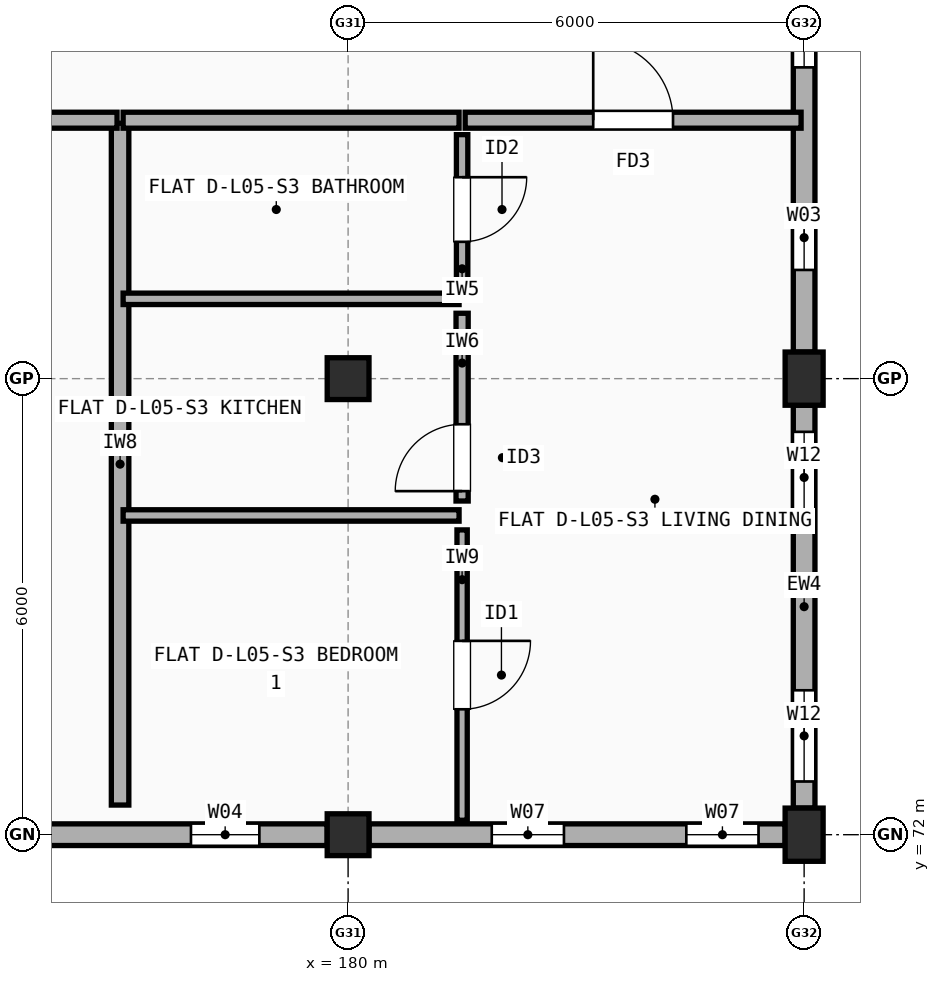
"""IFC4 building model, lengths in metres.
Left out: names, types, materials, properties, quantities, classifications, styles, units other than length and angle.
Written with IfcOpenShell. Run it as: python <this file> out.ifc"""

import sys

from ifc_helpers import new_model, si_unit, direction, frame, frame_2d, origin, origin_2d, place, context, subcontext, project, spatial, rectangle, extrude, element, fill, save


model = new_model("IFC4")
c1 = context("Model", 3, precision=1e-05, world=origin(), true_north=direction((0.0, 1.0)))
c2 = subcontext(c1, "Body", "Model", "MODEL_VIEW")
j1 = project(units=[si_unit("LENGTHUNIT", "METRE"), si_unit("PLANEANGLEUNIT", "RADIAN")], contexts=[c1])
p1 = place(None, origin())
s1 = spatial("IfcSite", under=j1, at=p1, CompositionType="ELEMENT")
p2 = place(p1, origin())
s2 = spatial("IfcBuilding", under=s1, at=p2, CompositionType="ELEMENT")
p3 = place(p2, frame((0.0, 0.0, 17.3)))
s3 = spatial("IfcBuildingStorey", under=s2, at=p3, CompositionType="ELEMENT", Elevation=17.3)
for number, where, z_axis, x_axis in (
    (1, (180.0, 72.0, 0.0), (0.0, 0.0, 1.0), (1.0, 0.0, 0.0)),
    (2, (180.0, 78.0, 0.0), (0.0, 0.0, 1.0), (1.0, 0.0, 0.0)),
):
    element("IfcColumn", number, at=place(p3, frame(where, z_axis=z_axis, x_axis=x_axis)), inside=s3, PredefinedType="COLUMN", context=c2, shape_type="SweptSolid", body=[
        extrude(rectangle(XDim=0.55, YDim=0.55, at=origin_2d()), origin(), (0.0, 0.0, 1.0), 2.965),
    ])
for number, where, z_axis, x_axis in (
    (3, (186.0, 72.0, 0.0), (0.0, 0.0, 1.0), (1.0, 0.0, 0.0)),
    (4, (186.0, 78.0, 0.0), (0.0, 0.0, 1.0), (1.0, 0.0, 0.0)),
):
    element("IfcColumn", number, at=place(p3, frame(where, z_axis=z_axis, x_axis=x_axis)), inside=s3, PredefinedType="COLUMN", context=c2, shape_type="SweptSolid", body=[
        extrude(rectangle(XDim=0.5, YDim=0.7, at=origin_2d()), origin(), (0.0, 0.0, 1.0), 2.965),
    ])
p4 = place(p3, frame((174.275, 72.0, 0.0), z_axis=(0.0, 0.0, 1.0), x_axis=(1.0, 0.0, 0.0)))
e5 = element("IfcWall", 5, at=p4, inside=s3, PredefinedType="STANDARD", context=c2, shape_type="SweptSolid", body=[
    extrude(rectangle(XDim=5.45, YDim=0.285, at=frame_2d((2.725, 0.0))), origin(), (0.0, 0.0, 1.0), 2.447),
])
p5 = place(p4, frame((0.917, 0.0, 0.9)))
e6 = element("IfcOpeningElement", 6, at=p5, cuts=e5, PredefinedType="OPENING", context=c2, shape_type="SweptSolid", body=[
    extrude(rectangle(XDim=0.85, YDim=1.25, at=frame_2d((0.425, 0.625))), frame((0.0, 0.152, 0.0), z_axis=(0.0, -1.0, 0.0), x_axis=(1.0, 0.0, 0.0)), (0.0, 0.0, 1.0), 0.305),
])
p6 = place(p4, frame((3.657, 0.0, 0.9)))
e7 = element("IfcOpeningElement", 7, at=p6, cuts=e5, PredefinedType="OPENING", context=c2, shape_type="SweptSolid", body=[
    extrude(rectangle(XDim=0.9, YDim=1.3, at=frame_2d((0.45, 0.65))), frame((0.0, 0.152, 0.0), z_axis=(0.0, -1.0, 0.0), x_axis=(1.0, 0.0, 0.0)), (0.0, 0.0, 1.0), 0.305),
])
p7 = place(p3, frame((180.275, 72.0, 0.0), z_axis=(0.0, 0.0, 1.0), x_axis=(1.0, 0.0, 0.0)))
e8 = element("IfcWall", 8, at=p7, inside=s3, PredefinedType="STANDARD", context=c2, shape_type="SweptSolid", body=[
    extrude(rectangle(XDim=5.475, YDim=0.285, at=frame_2d((2.738, 0.0))), origin(), (0.0, 0.0, 1.0), 2.447),
])
p8 = place(p7, frame((1.615, 0.0, 0.9)))
e9 = element("IfcOpeningElement", 9, at=p8, cuts=e8, PredefinedType="OPENING", context=c2, shape_type="SweptSolid", body=[
    extrude(rectangle(XDim=0.95, YDim=1.35, at=frame_2d((0.475, 0.675))), frame((0.0, 0.152, 0.0), z_axis=(0.0, -1.0, 0.0), x_axis=(1.0, 0.0, 0.0)), (0.0, 0.0, 1.0), 0.305),
])
p9 = place(p7, frame((4.175, 0.0, 0.9)))
e10 = element("IfcOpeningElement", 10, at=p9, cuts=e8, PredefinedType="OPENING", context=c2, shape_type="SweptSolid", body=[
    extrude(rectangle(XDim=0.95, YDim=1.35, at=frame_2d((0.475, 0.675))), frame((0.0, 0.152, 0.0), z_axis=(0.0, -1.0, 0.0), x_axis=(1.0, 0.0, 0.0)), (0.0, 0.0, 1.0), 0.305),
])
p10 = place(p3, frame((186.0, 72.35, 0.0), z_axis=(0.0, 0.0, 1.0), x_axis=(0.0, 1.0, 0.0)))
e11 = element("IfcWall", 11, at=p10, inside=s3, PredefinedType="STANDARD", context=c2, shape_type="SweptSolid", body=[
    extrude(rectangle(XDim=5.3, YDim=0.285, at=frame_2d((2.65, 0.0))), origin(), (0.0, 0.0, 1.0), 2.447),
])
p11 = place(p10, frame((0.35, 0.0, 0.9)))
e12 = element("IfcOpeningElement", 12, at=p11, cuts=e11, PredefinedType="OPENING", context=c2, shape_type="SweptSolid", body=[
    extrude(rectangle(XDim=1.2, YDim=1.35, at=frame_2d((0.6, 0.675))), frame((0.0, 0.152, 0.0), z_axis=(0.0, -1.0, 0.0), x_axis=(1.0, 0.0, 0.0)), (0.0, 0.0, 1.0), 0.305),
])
p12 = place(p10, frame((3.75, 0.0, 0.9)))
e13 = element("IfcOpeningElement", 13, at=p12, cuts=e11, PredefinedType="OPENING", context=c2, shape_type="SweptSolid", body=[
    extrude(rectangle(XDim=1.2, YDim=1.35, at=frame_2d((0.6, 0.675))), frame((0.0, 0.152, 0.0), z_axis=(0.0, -1.0, 0.0), x_axis=(1.0, 0.0, 0.0)), (0.0, 0.0, 1.0), 0.305),
])
p13 = place(p3, frame((186.0, 78.35, 0.0), z_axis=(0.0, 0.0, 1.0), x_axis=(0.0, 1.0, 0.0)))
e14 = element("IfcWall", 14, at=p13, inside=s3, PredefinedType="STANDARD", context=c2, shape_type="SweptSolid", body=[
    extrude(rectangle(XDim=5.3, YDim=0.285, at=frame_2d((2.65, 0.0))), origin(), (0.0, 0.0, 1.0), 2.447),
])
p14 = place(p13, frame((1.08, 0.0, 0.9)))
e15 = element("IfcOpeningElement", 15, at=p14, cuts=e14, PredefinedType="OPENING", context=c2, shape_type="SweptSolid", body=[
    extrude(rectangle(XDim=0.85, YDim=1.25, at=frame_2d((0.425, 0.625))), frame((0.0, 0.152, 0.0), z_axis=(0.0, -1.0, 0.0), x_axis=(1.0, 0.0, 0.0)), (0.0, 0.0, 1.0), 0.305),
])
p15 = place(p13, frame((3.745, 0.0, 0.9)))
e16 = element("IfcOpeningElement", 16, at=p15, cuts=e14, PredefinedType="OPENING", context=c2, shape_type="SweptSolid", body=[
    extrude(rectangle(XDim=0.9, YDim=1.3, at=frame_2d((0.45, 0.65))), frame((0.0, 0.152, 0.0), z_axis=(0.0, -1.0, 0.0), x_axis=(1.0, 0.0, 0.0)), (0.0, 0.0, 1.0), 0.305),
])
p16 = place(p3, frame((177.0, 72.39, 0.0), z_axis=(0.0, 0.0, 1.0), x_axis=(0.0, 1.0, 0.0)))
e17 = element("IfcWall", 17, at=p16, inside=s3, PredefinedType="SOLIDWALL", context=c2, shape_type="SweptSolid", body=[
    extrude(rectangle(XDim=8.97, YDim=0.23, at=frame_2d((4.485, 0.0))), origin(), (0.0, 0.0, 1.0), 2.447),
])
p17 = place(p3, frame((171.04, 81.4, 0.0), z_axis=(0.0, 0.0, 1.0), x_axis=(1.0, 0.0, 0.0)))
e18 = element("IfcWall", 18, at=p17, inside=s3, PredefinedType="SOLIDWALL", context=c2, shape_type="SweptSolid", body=[
    extrude(rectangle(XDim=5.92, YDim=0.21, at=frame_2d((2.96, 0.0))), origin(), (0.0, 0.0, 1.0), 2.508),
])
p18 = place(p17, frame((2.47, 0.0, 0.0)))
e19 = element("IfcOpeningElement", 19, at=p18, cuts=e18, PredefinedType="OPENING", context=c2, shape_type="SweptSolid", body=[
    extrude(rectangle(XDim=0.98, YDim=2.15, at=frame_2d((0.49, 1.075))), frame((0.0, 0.115, 0.0), z_axis=(0.0, -1.0, 0.0), x_axis=(1.0, 0.0, 0.0)), (0.0, 0.0, 1.0), 0.23),
])
p19 = place(p3, frame((177.04, 81.4, 0.0), z_axis=(0.0, 0.0, 1.0), x_axis=(1.0, 0.0, 0.0)))
e20 = element("IfcWall", 20, at=p19, inside=s3, PredefinedType="SOLIDWALL", context=c2, shape_type="SweptSolid", body=[
    extrude(rectangle(XDim=4.42, YDim=0.21, at=frame_2d((2.21, 0.0))), origin(), (0.0, 0.0, 1.0), 2.508),
])
p20 = place(p3, frame((181.54, 81.4, 0.0), z_axis=(0.0, 0.0, 1.0), x_axis=(1.0, 0.0, 0.0)))
e21 = element("IfcWall", 21, at=p20, inside=s3, PredefinedType="SOLIDWALL", context=c2, shape_type="SweptSolid", body=[
    extrude(rectangle(XDim=4.42, YDim=0.21, at=frame_2d((2.21, 0.0))), origin(), (0.0, 0.0, 1.0), 2.447),
])
p21 = place(p20, frame((1.685, 0.0, 0.0)))
e22 = element("IfcOpeningElement", 22, at=p21, cuts=e21, PredefinedType="OPENING", context=c2, shape_type="SweptSolid", body=[
    extrude(rectangle(XDim=1.05, YDim=2.15, at=frame_2d((0.525, 1.075))), frame((0.0, 0.115, 0.0), z_axis=(0.0, -1.0, 0.0), x_axis=(1.0, 0.0, 0.0)), (0.0, 0.0, 1.0), 0.23),
])
p22 = place(p3, frame((181.5, 72.19, 0.0), z_axis=(0.0, 0.0, 1.0), x_axis=(0.0, 1.0, 0.0)))
e23 = element("IfcWall", 23, at=p22, inside=s3, PredefinedType="PARTITIONING", context=c2, shape_type="SweptSolid", body=[
    extrude(rectangle(XDim=3.82, YDim=0.135, at=frame_2d((1.91, 0.0))), origin(), (0.0, 0.0, 1.0), 2.965),
])
p23 = place(p22, frame((1.46, 0.0, 0.0)))
e24 = element("IfcOpeningElement", 24, at=p23, cuts=e23, PredefinedType="OPENING", context=c2, shape_type="SweptSolid", body=[
    extrude(rectangle(XDim=0.9, YDim=2.1, at=frame_2d((0.45, 1.05))), frame((0.0, 0.077, 0.0), z_axis=(0.0, -1.0, 0.0), x_axis=(1.0, 0.0, 0.0)), (0.0, 0.0, 1.0), 0.155),
])
p24 = place(p3, frame((181.5, 76.39, 0.0), z_axis=(0.0, 0.0, 1.0), x_axis=(0.0, 1.0, 0.0)))
e25 = element("IfcWall", 25, at=p24, inside=s3, PredefinedType="PLUMBINGWALL", context=c2, shape_type="SweptSolid", body=[
    extrude(rectangle(XDim=2.47, YDim=0.16, at=frame_2d((1.235, 0.0))), origin(), (0.0, 0.0, 1.0), 2.447),
])
p25 = place(p24, frame((0.13, 0.0, 0.0)))
e26 = element("IfcOpeningElement", 26, at=p25, cuts=e25, PredefinedType="OPENING", context=c2, shape_type="SweptSolid", body=[
    extrude(rectangle(XDim=0.88, YDim=2.1, at=frame_2d((0.44, 1.05))), frame((0.0, 0.09, 0.0), z_axis=(0.0, -1.0, 0.0), x_axis=(1.0, 0.0, 0.0)), (0.0, 0.0, 1.0), 0.18),
])
p26 = place(p3, frame((181.5, 79.24, 0.0), z_axis=(0.0, 0.0, 1.0), x_axis=(0.0, 1.0, 0.0)))
e27 = element("IfcWall", 27, at=p26, inside=s3, PredefinedType="PARTITIONING", context=c2, shape_type="SweptSolid", body=[
    extrude(rectangle(XDim=1.97, YDim=0.15, at=frame_2d((0.985, 0.0))), origin(), (0.0, 0.0, 1.0), 2.965),
])
p27 = place(p26, frame((0.56, 0.0, 0.0)))
e28 = element("IfcOpeningElement", 28, at=p27, cuts=e27, PredefinedType="OPENING", context=c2, shape_type="SweptSolid", body=[
    extrude(rectangle(XDim=0.85, YDim=2.1, at=frame_2d((0.425, 1.05))), frame((0.0, 0.085, 0.0), z_axis=(0.0, -1.0, 0.0), x_axis=(1.0, 0.0, 0.0)), (0.0, 0.0, 1.0), 0.17),
])
p28 = place(p3, frame((177.04, 76.2, 0.0), z_axis=(0.0, 0.0, 1.0), x_axis=(1.0, 0.0, 0.0)))
e29 = element("IfcWall", 29, at=p28, inside=s3, PredefinedType="PARTITIONING", context=c2, shape_type="SweptSolid", body=[
    extrude(rectangle(XDim=4.42, YDim=0.15, at=frame_2d((2.21, 0.0))), origin(), (0.0, 0.0, 1.0), 2.548),
])
p29 = place(p3, frame((177.04, 79.05, 0.0), z_axis=(0.0, 0.0, 1.0), x_axis=(1.0, 0.0, 0.0)))
e30 = element("IfcWall", 30, at=p29, inside=s3, PredefinedType="PARTITIONING", context=c2, shape_type="SweptSolid", body=[
    extrude(rectangle(XDim=4.42, YDim=0.15, at=frame_2d((2.21, 0.0))), origin(), (0.0, 0.0, 1.0), 2.508),
])
p30 = place(p6, origin())
e31 = element("IfcWindow", 31, at=p30, inside=s3, PartitioningType="SINGLE_PANEL", PredefinedType="WINDOW", context=c2, shape_type="SweptSolid", body=[
    extrude(rectangle(XDim=0.9, YDim=1.3, at=frame_2d((0.45, 0.65))), frame((0.0, 0.03, 0.0), z_axis=(0.0, -1.0, 0.0), x_axis=(1.0, 0.0, 0.0)), (0.0, 0.0, 1.0), 0.06),
])
fill(e7, e31)
p31 = place(p8, origin())
e32 = element("IfcWindow", 32, at=p31, inside=s3, PartitioningType="SINGLE_PANEL", PredefinedType="WINDOW", context=c2, shape_type="SweptSolid", body=[
    extrude(rectangle(XDim=0.95, YDim=1.35, at=frame_2d((0.475, 0.675))), frame((0.0, 0.03, 0.0), z_axis=(0.0, -1.0, 0.0), x_axis=(1.0, 0.0, 0.0)), (0.0, 0.0, 1.0), 0.06),
])
fill(e9, e32)
p32 = place(p9, origin())
e33 = element("IfcWindow", 33, at=p32, inside=s3, PartitioningType="SINGLE_PANEL", PredefinedType="WINDOW", context=c2, shape_type="SweptSolid", body=[
    extrude(rectangle(XDim=0.95, YDim=1.35, at=frame_2d((0.475, 0.675))), frame((0.0, 0.03, 0.0), z_axis=(0.0, -1.0, 0.0), x_axis=(1.0, 0.0, 0.0)), (0.0, 0.0, 1.0), 0.06),
])
fill(e10, e33)
p33 = place(p11, origin())
e34 = element("IfcWindow", 34, at=p33, inside=s3, PartitioningType="SINGLE_PANEL", PredefinedType="WINDOW", context=c2, shape_type="SweptSolid", body=[
    extrude(rectangle(XDim=1.2, YDim=1.35, at=frame_2d((0.6, 0.675))), frame((0.0, 0.03, 0.0), z_axis=(0.0, -1.0, 0.0), x_axis=(1.0, 0.0, 0.0)), (0.0, 0.0, 1.0), 0.06),
])
fill(e12, e34)
p34 = place(p12, origin())
e35 = element("IfcWindow", 35, at=p34, inside=s3, PartitioningType="SINGLE_PANEL", PredefinedType="WINDOW", context=c2, shape_type="SweptSolid", body=[
    extrude(rectangle(XDim=1.2, YDim=1.35, at=frame_2d((0.6, 0.675))), frame((0.0, 0.03, 0.0), z_axis=(0.0, -1.0, 0.0), x_axis=(1.0, 0.0, 0.0)), (0.0, 0.0, 1.0), 0.06),
])
fill(e13, e35)
p35 = place(p14, origin())
e36 = element("IfcWindow", 36, at=p35, inside=s3, PartitioningType="SINGLE_PANEL", PredefinedType="WINDOW", context=c2, shape_type="SweptSolid", body=[
    extrude(rectangle(XDim=0.85, YDim=1.25, at=frame_2d((0.425, 0.625))), frame((0.0, 0.03, 0.0), z_axis=(0.0, -1.0, 0.0), x_axis=(1.0, 0.0, 0.0)), (0.0, 0.0, 1.0), 0.06),
])
fill(e15, e36)
p36 = place(p15, origin())
e37 = element("IfcWindow", 37, at=p36, inside=s3, PartitioningType="SINGLE_PANEL", PredefinedType="WINDOW", context=c2, shape_type="SweptSolid", body=[
    extrude(rectangle(XDim=0.9, YDim=1.3, at=frame_2d((0.45, 0.65))), frame((0.0, 0.03, 0.0), z_axis=(0.0, -1.0, 0.0), x_axis=(1.0, 0.0, 0.0)), (0.0, 0.0, 1.0), 0.06),
])
fill(e16, e37)
p37 = place(p21, origin())
e38 = element("IfcDoor", 38, at=p37, inside=s3, OperationType="SINGLE_SWING_LEFT", PredefinedType="DOOR", context=c2, shape_type="SweptSolid", body=[
    extrude(rectangle(XDim=1.05, YDim=2.15, at=frame_2d((0.525, 1.075))), frame((0.0, 0.025, 0.0), z_axis=(0.0, -1.0, 0.0), x_axis=(1.0, 0.0, 0.0)), (0.0, 0.0, 1.0), 0.05),
])
fill(e22, e38)
p38 = place(p23, origin())
e39 = element("IfcDoor", 39, at=p38, inside=s3, OperationType="SINGLE_SWING_RIGHT", PredefinedType="DOOR", context=c2, shape_type="SweptSolid", body=[
    extrude(rectangle(XDim=0.9, YDim=2.1, at=frame_2d((0.45, 1.05))), frame((0.0, 0.025, 0.0), z_axis=(0.0, -1.0, 0.0), x_axis=(1.0, 0.0, 0.0)), (0.0, 0.0, 1.0), 0.05),
])
fill(e24, e39)
p39 = place(p25, origin())
e40 = element("IfcDoor", 40, at=p39, inside=s3, OperationType="SINGLE_SWING_LEFT", PredefinedType="DOOR", context=c2, shape_type="SweptSolid", body=[
    extrude(rectangle(XDim=0.88, YDim=2.1, at=frame_2d((0.44, 1.05))), frame((0.0, 0.025, 0.0), z_axis=(0.0, -1.0, 0.0), x_axis=(1.0, 0.0, 0.0)), (0.0, 0.0, 1.0), 0.05),
])
fill(e26, e40)
p40 = place(p27, origin())
e41 = element("IfcDoor", 41, at=p40, inside=s3, OperationType="SINGLE_SWING_RIGHT", PredefinedType="DOOR", context=c2, shape_type="SweptSolid", body=[
    extrude(rectangle(XDim=0.85, YDim=2.1, at=frame_2d((0.425, 1.05))), frame((0.0, 0.025, 0.0), z_axis=(0.0, -1.0, 0.0), x_axis=(1.0, 0.0, 0.0)), (0.0, 0.0, 1.0), 0.05),
])
fill(e28, e41)
save(model, sys.argv[1])
